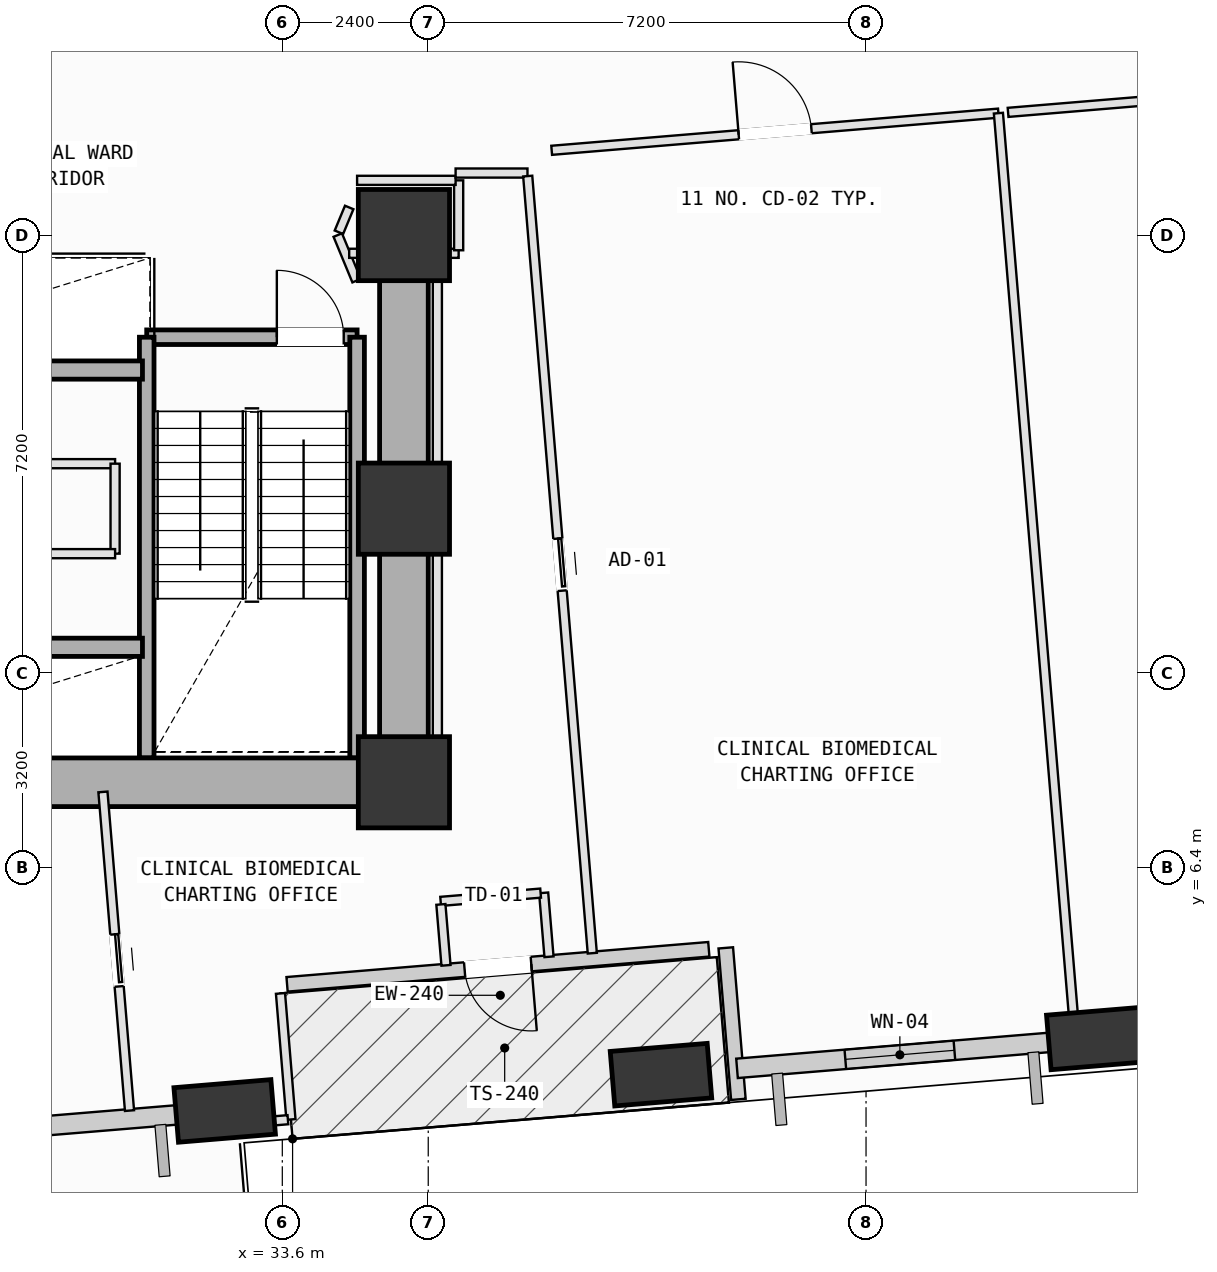
"""IFC4 building model, lengths in metres.
Left out: names, types, materials, properties, quantities, classifications, styles, units other than length and angle.
Written with IfcOpenShell. Run it as: python <this file> out.ifc"""

import sys

from ifc_helpers import new_model, si_unit, direction, frame, frame_2d, origin, origin_2d, place, context, subcontext, project, spatial, rectangle, extrude, element, fill, save


model = new_model("IFC4")
c1 = context("Model", 3, precision=1e-05, world=origin(), true_north=direction((0.0, 1.0)))
c2 = subcontext(c1, "Body", "Model", "MODEL_VIEW")
j1 = project(units=[si_unit("LENGTHUNIT", "METRE"), si_unit("PLANEANGLEUNIT", "RADIAN")], contexts=[c1])
p1 = place(None, origin())
s1 = spatial("IfcSite", under=j1, at=p1, CompositionType="ELEMENT")
p2 = place(p1, origin())
s2 = spatial("IfcBuilding", under=s1, at=p2, CompositionType="ELEMENT")
p3 = place(p2, frame((0.0, 0.0, 43.0)))
s3 = spatial("IfcBuildingStorey", under=s2, at=p3, CompositionType="ELEMENT", Elevation=43.0)
for number, where, z_axis, x_axis in (
    (1, (35.6, 7.8, 0.0), (0.0, 0.0, 1.0), (1.0, 0.0, 0.0)),
    (2, (35.6, 12.3, 0.0), (0.0, 0.0, 1.0), (1.0, 0.0, 0.0)),
    (3, (35.6, 16.8, 0.0), (0.0, 0.0, 1.0), (1.0, 0.0, 0.0)),
):
    element("IfcColumn", number, at=place(p3, frame(where, z_axis=z_axis, x_axis=x_axis)), inside=s3, PredefinedType="COLUMN", context=c2, shape_type="SweptSolid", body=[
        extrude(rectangle(XDim=1.5, YDim=1.5, at=origin_2d()), origin(), (0.0, 0.0, 1.0), 4.0),
    ])
p4 = place(p3, frame((32.652, 2.395, 0.002), z_axis=(0.092454615245, -0.003162921048, 0.995711876022), x_axis=(-0.048331810762, 0.998801958908, 0.007660479794)))
e4 = element("IfcColumn", 4, at=p4, inside=s3, PredefinedType="COLUMN", context=c2, shape_type="SweptSolid", body=[
    extrude(rectangle(XDim=1.6, YDim=0.9, at=origin_2d()), origin(), (0.0, 0.0, 1.0), 4.014),
])
p5 = place(p3, frame((39.828, 2.991, 0.002), z_axis=(0.08976921486, 0.026456374298, 0.995611143129), x_axis=(-0.360804993804, 0.932609081019, 0.007749738583)))
e5 = element("IfcColumn", 5, at=p5, inside=s3, PredefinedType="COLUMN", context=c2, shape_type="SweptSolid", body=[
    extrude(rectangle(XDim=1.6, YDim=0.9, at=origin_2d()), origin(), (0.0, 0.0, 1.0), 4.014),
])
p6 = place(p3, frame((47.003, 3.587, 0.002), z_axis=(0.087007750901, 0.05595959398, 0.99463469431), x_axis=(-0.608351167105, 0.793621744244, 0.008566477999)))
e6 = element("IfcColumn", 6, at=p6, inside=s3, PredefinedType="COLUMN", context=c2, shape_type="SweptSolid", body=[
    extrude(rectangle(XDim=1.6, YDim=0.9, at=origin_2d()), origin(), (0.0, 0.0, 1.0), 4.018),
])
p7 = place(p3, frame((40.614, 5.053, 0.0), z_axis=(0.0, 0.0, 1.0), x_axis=(-0.99656749658, -0.082784205981, 0.0)))
e7 = element("IfcWall", 7, at=p7, inside=s3, PredefinedType="SOLIDWALL", context=c2, shape_type="SweptSolid", body=[
    extrude(rectangle(XDim=6.96, YDim=0.24, at=frame_2d((3.48, 0.0))), origin(), (0.0, 0.0, 1.0), 3.165),
])
p8 = place(p7, frame((2.93, 0.0, 0.0)))
e8 = element("IfcOpeningElement", 8, at=p8, cuts=e7, PredefinedType="OPENING", context=c2, shape_type="SweptSolid", body=[
    extrude(rectangle(XDim=1.1, YDim=2.15, at=frame_2d((0.55, 1.075))), frame((0.0, 0.13, 0.0), z_axis=(0.0, -1.0, 0.0), x_axis=(1.0, 0.0, 0.0)), (0.0, 0.0, 1.0), 0.26),
])
p9 = place(p3, frame((41.1, 2.585, 0.0), z_axis=(0.0, 0.0, 1.0), x_axis=(-0.082811106501, 0.996565261606, 0.0)))
e9 = element("IfcWall", 9, at=p9, inside=s3, PredefinedType="SOLIDWALL", context=c2, shape_type="SweptSolid", body=[
    extrude(rectangle(XDim=2.5, YDim=0.24, at=frame_2d((1.25, 0.0))), origin(), (0.0, 0.0, 1.0), 3.165),
])
p10 = place(p3, frame((32.231, 2.36, 0.0), z_axis=(0.0, 0.0, 1.0), x_axis=(-0.996564006264, -0.082826212145, 0.0)))
e10 = element("IfcWall", 10, at=p10, inside=s3, PredefinedType="SOLIDWALL", context=c2, shape_type="SweptSolid", body=[
    extrude(rectangle(XDim=5.99, YDim=0.32, at=frame_2d((2.995, 0.0))), origin(), (0.0, 0.0, 1.0), 3.165),
])
p11 = place(p10, frame((2.967, 0.0, 0.75)))
e11 = element("IfcOpeningElement", 11, at=p11, cuts=e10, PredefinedType="OPENING", context=c2, shape_type="SweptSolid", body=[
    extrude(rectangle(XDim=1.4, YDim=1.85, at=frame_2d((0.7, 0.925))), frame((0.0, 0.17, 0.0), z_axis=(0.0, -1.0, 0.0), x_axis=(1.0, 0.0, 0.0)), (0.0, 0.0, 1.0), 0.34),
])
p12 = place(p3, frame((46.588, 3.552, 0.0), z_axis=(0.0, 0.0, 1.0), x_axis=(-0.99656613328, -0.082800615939, 0.0)))
e12 = element("IfcWall", 12, at=p12, inside=s3, PredefinedType="SOLIDWALL", context=c2, shape_type="SweptSolid", body=[
    extrude(rectangle(XDim=5.529, YDim=0.32, at=frame_2d((2.764, 0.0))), origin(), (0.0, 0.0, 1.0), 3.145),
])
p13 = place(p12, frame((1.941, 0.0, 0.75)))
e13 = element("IfcOpeningElement", 13, at=p13, cuts=e12, PredefinedType="OPENING", context=c2, shape_type="SweptSolid", body=[
    extrude(rectangle(XDim=1.8, YDim=2.05, at=frame_2d((0.9, 1.025))), frame((0.0, 0.17, 0.0), z_axis=(0.0, -1.0, 0.0), x_axis=(1.0, 0.0, 0.0)), (0.0, 0.0, 1.0), 0.34),
])
p14 = place(p3, frame((31.37, 15.12, 0.0), z_axis=(0.0, 0.0, 1.0), x_axis=(1.0, 0.0, 0.0)))
e14 = element("IfcWall", 14, at=p14, inside=s3, PredefinedType="SOLIDWALL", context=c2, shape_type="SweptSolid", body=[
    extrude(rectangle(XDim=3.46, YDim=0.24, at=frame_2d((1.73, 0.0))), origin(), (0.0, 0.0, 1.0), 3.78),
])
p15 = place(p14, frame((2.14, 0.0, 0.0)))
e15 = element("IfcOpeningElement", 15, at=p15, cuts=e14, PredefinedType="OPENING", context=c2, shape_type="SweptSolid", body=[
    extrude(rectangle(XDim=1.1, YDim=2.15, at=frame_2d((0.55, 1.075))), frame((0.0, 0.13, 0.0), z_axis=(0.0, -1.0, 0.0), x_axis=(1.0, 0.0, 0.0)), (0.0, 0.0, 1.0), 0.26),
])
for number, where, z_axis, x_axis in (
    (16, (34.83, 15.12, 0.0), (0.0, 0.0, 1.0), (0.0, -1.0, 0.0)),
    (17, (31.37, 8.2, 0.0), (0.0, 0.0, 1.0), (0.0, 1.0, 0.0)),
):
    element("IfcWall", number, at=place(p3, frame(where, z_axis=z_axis, x_axis=x_axis)), inside=s3, PredefinedType="SOLIDWALL", context=c2, shape_type="SweptSolid", body=[
        extrude(rectangle(XDim=6.92, YDim=0.24, at=frame_2d((3.46, 0.0))), origin(), (0.0, 0.0, 1.0), 3.78),
    ])
p16 = place(p3, frame((24.8, 7.8, 0.0), z_axis=(0.0, 0.0, 1.0), x_axis=(1.0, 0.0, 0.0)))
e18 = element("IfcWall", 18, at=p16, inside=s3, PredefinedType="SHEAR", context=c2, shape_type="SweptSolid", body=[
    extrude(rectangle(XDim=10.8, YDim=0.8, at=frame_2d((5.4, 0.0))), origin(), (0.0, 0.0, 1.0), 3.78),
])
p17 = place(p3, frame((35.6, 7.8, 0.0), z_axis=(0.0, 0.0, 1.0), x_axis=(0.0, 1.0, 0.0)))
e19 = element("IfcWall", 19, at=p17, inside=s3, PredefinedType="SHEAR", context=c2, shape_type="SweptSolid", body=[
    extrude(rectangle(XDim=9.0, YDim=0.8, at=frame_2d((4.5, 0.0))), origin(), (0.0, 0.0, 1.0), 3.78),
])
p18 = place(p3, frame((25.85, 10.02, 0.0), z_axis=(0.0, 0.0, 1.0), x_axis=(1.0, 0.0, 0.0)))
e20 = element("IfcWall", 20, at=p18, inside=s3, PredefinedType="SOLIDWALL", context=c2, shape_type="SweptSolid", body=[
    extrude(rectangle(XDim=5.45, YDim=0.3, at=frame_2d((2.725, 0.0))), origin(), (0.0, 0.0, 1.0), 3.78),
])
p19 = place(p18, frame((0.34, 0.0, 0.0)))
e21 = element("IfcOpeningElement", 21, at=p19, cuts=e20, PredefinedType="OPENING", context=c2, shape_type="SweptSolid", body=[
    extrude(rectangle(XDim=1.12, YDim=2.15, at=frame_2d((0.56, 1.075))), frame((0.0, 0.16, 0.0), z_axis=(0.0, -1.0, 0.0), x_axis=(1.0, 0.0, 0.0)), (0.0, 0.0, 1.0), 0.32),
])
p20 = place(p18, frame((2.24, 0.0, 0.0)))
e22 = element("IfcOpeningElement", 22, at=p20, cuts=e20, PredefinedType="OPENING", context=c2, shape_type="SweptSolid", body=[
    extrude(rectangle(XDim=1.12, YDim=2.15, at=frame_2d((0.56, 1.075))), frame((0.0, 0.16, 0.0), z_axis=(0.0, -1.0, 0.0), x_axis=(1.0, 0.0, 0.0)), (0.0, 0.0, 1.0), 0.32),
])
p21 = place(p3, frame((25.85, 14.58, 0.0), z_axis=(0.0, 0.0, 1.0), x_axis=(1.0, 0.0, 0.0)))
e23 = element("IfcWall", 23, at=p21, inside=s3, PredefinedType="SOLIDWALL", context=c2, shape_type="SweptSolid", body=[
    extrude(rectangle(XDim=5.45, YDim=0.3, at=frame_2d((2.725, 0.0))), origin(), (0.0, 0.0, 1.0), 3.78),
])
p22 = place(p3, frame((26.45, 13.04, 0.0), z_axis=(0.0, 0.0, 1.0), x_axis=(1.0, 0.0, 0.0)))
e24 = element("IfcWall", 24, at=p22, inside=s3, PredefinedType="PARTITIONING", context=c2, shape_type="SweptSolid", body=[
    extrude(rectangle(XDim=4.4, YDim=0.15, at=frame_2d((2.2, 0.0))), origin(), (0.0, 0.0, 1.0), 3.78),
])
p23 = place(p22, frame((1.74, 0.0, 0.0)))
e25 = element("IfcOpeningElement", 25, at=p23, cuts=e24, PredefinedType="OPENING", context=c2, shape_type="SweptSolid", body=[
    extrude(rectangle(XDim=0.92, YDim=2.1, at=frame_2d((0.46, 1.05))), frame((0.0, 0.085, 0.0), z_axis=(0.0, -1.0, 0.0), x_axis=(1.0, 0.0, 0.0)), (0.0, 0.0, 1.0), 0.17),
])
p24 = place(p3, frame((30.85, 13.04, 0.0), z_axis=(0.0, 0.0, 1.0), x_axis=(0.0, -1.0, 0.0)))
e26 = element("IfcWall", 26, at=p24, inside=s3, PredefinedType="PARTITIONING", context=c2, shape_type="SweptSolid", body=[
    extrude(rectangle(XDim=1.48, YDim=0.15, at=frame_2d((0.74, 0.0))), origin(), (0.0, 0.0, 1.0), 3.78),
])
p25 = place(p3, frame((30.85, 11.56, 0.0), z_axis=(0.0, 0.0, 1.0), x_axis=(-1.0, 0.0, 0.0)))
e27 = element("IfcWall", 27, at=p25, inside=s3, PredefinedType="PARTITIONING", context=c2, shape_type="SweptSolid", body=[
    extrude(rectangle(XDim=4.4, YDim=0.15, at=frame_2d((2.2, 0.0))), origin(), (0.0, 0.0, 1.0), 3.78),
])
p26 = place(p3, frame((30.65, 7.641, 0.0), z_axis=(0.0, 0.0, 1.0), x_axis=(0.083091579505, -0.996541915534, 0.0)))
e28 = element("IfcWall", 28, at=p26, inside=s3, PredefinedType="PARTITIONING", context=c2, shape_type="SweptSolid", body=[
    extrude(rectangle(XDim=5.259, YDim=0.15, at=frame_2d((2.63, 0.0))), origin(), (0.0, 0.0, 1.0), 3.78),
])
p27 = place(p26, frame((2.35, 0.0, 0.0)))
e29 = element("IfcOpeningElement", 29, at=p27, cuts=e28, PredefinedType="OPENING", context=c2, shape_type="SweptSolid", body=[
    extrude(rectangle(XDim=0.86, YDim=2.06, at=frame_2d((0.43, 1.03))), frame((0.0, 0.085, 0.0), z_axis=(0.0, -1.0, 0.0), x_axis=(1.0, 0.0, 0.0)), (0.0, 0.0, 1.0), 0.17),
])
p28 = place(p3, frame((36.15, 7.5, 0.0), z_axis=(0.0, 0.0, 1.0), x_axis=(0.0, 1.0, 0.0)))
e30 = element("IfcWall", 30, at=p28, inside=s3, PredefinedType="PARTITIONING", context=c2, shape_type="SweptSolid", body=[
    extrude(rectangle(XDim=8.84, YDim=0.15, at=frame_2d((4.42, 0.0))), origin(), (0.0, 0.0, 1.0), 3.78),
])
p29 = place(p3, frame((34.822, 16.05, 0.0), z_axis=(0.0, 0.0, 1.0), x_axis=(-0.382050639738, 0.924141389981, 0.0)))
e31 = element("IfcWall", 31, at=p29, inside=s3, PredefinedType="PARTITIONING", context=c2, shape_type="SweptSolid", body=[
    extrude(rectangle(XDim=0.812, YDim=0.15, at=frame_2d((0.406, 0.0))), origin(), (0.0, 0.0, 1.0), 3.78),
])
p30 = place(p3, frame((34.531, 16.846, 0.0), z_axis=(0.0, 0.0, 1.0), x_axis=(0.382612233621, 0.923909020782, 0.0)))
e32 = element("IfcWall", 32, at=p30, inside=s3, PredefinedType="PARTITIONING", context=c2, shape_type="SweptSolid", body=[
    extrude(rectangle(XDim=0.442, YDim=0.15, at=frame_2d((0.221, 0.0))), origin(), (0.0, 0.0, 1.0), 3.78),
])
p31 = place(p3, frame((34.7, 16.5, 0.0), z_axis=(0.0, 0.0, 1.0), x_axis=(1.0, 0.0, 0.0)))
e33 = element("IfcWall", 33, at=p31, inside=s3, PredefinedType="PARTITIONING", context=c2, shape_type="SweptSolid", body=[
    extrude(rectangle(XDim=0.525, YDim=0.15, at=frame_2d((0.263, 0.0))), origin(), (0.0, 0.0, 1.0), 2.865),
])
p32 = place(p3, frame((35.975, 16.5, 0.0), z_axis=(0.0, 0.0, 1.0), x_axis=(1.0, 0.0, 0.0)))
e34 = element("IfcWall", 34, at=p32, inside=s3, PredefinedType="PARTITIONING", context=c2, shape_type="SweptSolid", body=[
    extrude(rectangle(XDim=0.525, YDim=0.15, at=frame_2d((0.262, 0.0))), origin(), (0.0, 0.0, 1.0), 3.78),
])
p33 = place(p3, frame((36.5, 16.55, 0.0), z_axis=(0.0, 0.0, 1.0), x_axis=(0.0, 1.0, 0.0)))
e35 = element("IfcWall", 35, at=p33, inside=s3, PredefinedType="PARTITIONING", context=c2, shape_type="SweptSolid", body=[
    extrude(rectangle(XDim=1.15, YDim=0.15, at=frame_2d((0.575, 0.0))), origin(), (0.0, 0.0, 1.0), 3.78),
])
p34 = place(p3, frame((36.45, 17.7, 0.0), z_axis=(0.0, 0.0, 1.0), x_axis=(-1.0, 0.0, 0.0)))
e36 = element("IfcWall", 36, at=p34, inside=s3, PredefinedType="PARTITIONING", context=c2, shape_type="SweptSolid", body=[
    extrude(rectangle(XDim=1.62, YDim=0.15, at=frame_2d((0.81, 0.0))), origin(), (0.0, 0.0, 1.0), 3.78),
])
p35 = place(p3, frame((36.45, 17.82, 0.0), z_axis=(0.0, 0.0, 1.0), x_axis=(1.0, 0.0, 0.0)))
e37 = element("IfcWall", 37, at=p35, inside=s3, PredefinedType="PARTITIONING", context=c2, shape_type="SweptSolid", body=[
    extrude(rectangle(XDim=1.182, YDim=0.15, at=frame_2d((0.591, 0.0))), origin(), (0.0, 0.0, 1.0), 3.78),
])
p36 = place(p3, frame((37.636, 17.77, 0.0), z_axis=(0.0, 0.0, 1.0), x_axis=(0.082807590284, -0.996565553785, 0.0)))
e38 = element("IfcWall", 38, at=p36, inside=s3, PredefinedType="PARTITIONING", context=c2, shape_type="SweptSolid", body=[
    extrude(rectangle(XDim=12.825, YDim=0.15, at=frame_2d((6.413, 0.0))), origin(), (0.0, 0.0, 1.0), 3.78),
])
p37 = place(p36, frame((5.982, 0.0, 0.0)))
e39 = element("IfcOpeningElement", 39, at=p37, cuts=e38, PredefinedType="OPENING", context=c2, shape_type="SweptSolid", body=[
    extrude(rectangle(XDim=0.86, YDim=2.06, at=frame_2d((0.43, 1.03))), frame((0.0, 0.085, 0.0), z_axis=(0.0, -1.0, 0.0), x_axis=(1.0, 0.0, 0.0)), (0.0, 0.0, 1.0), 0.17),
])
p38 = place(p3, frame((37.986, 4.93, 0.0), z_axis=(0.0, 0.0, 1.0), x_axis=(-0.083562696939, 0.996502521663, 0.0)))
e40 = element("IfcWall", 40, at=p38, inside=s3, PredefinedType="PARTITIONING", context=c2, shape_type="SweptSolid", body=[
    extrude(rectangle(XDim=1.055, YDim=0.15, at=frame_2d((0.527, 0.0))), origin(), (0.0, 0.0, 1.0), 3.78),
])
p39 = place(p3, frame((37.848, 5.977, 0.0), z_axis=(0.0, 0.0, 1.0), x_axis=(-0.996595596875, -0.08244523206, 0.0)))
e41 = element("IfcWall", 41, at=p39, inside=s3, PredefinedType="PARTITIONING", context=c2, shape_type="SweptSolid", body=[
    extrude(rectangle(XDim=1.649, YDim=0.15, at=frame_2d((0.825, 0.0))), origin(), (0.0, 0.0, 1.0), 3.78),
])
p40 = place(p3, frame((36.208, 5.791, 0.0), z_axis=(0.0, 0.0, 1.0), x_axis=(0.083527747419, -0.996505451772, 0.0)))
e42 = element("IfcWall", 42, at=p40, inside=s3, PredefinedType="PARTITIONING", context=c2, shape_type="SweptSolid", body=[
    extrude(rectangle(XDim=1.005, YDim=0.15, at=frame_2d((0.503, 0.0))), origin(), (0.0, 0.0, 1.0), 3.78),
])
p41 = place(p3, frame((33.57, 4.327, 0.0), z_axis=(0.0, 0.0, 1.0), x_axis=(0.082627800683, -0.996580476707, 0.0)))
e43 = element("IfcWall", 43, at=p41, inside=s3, PredefinedType="PARTITIONING", context=c2, shape_type="SweptSolid", body=[
    extrude(rectangle(XDim=2.08, YDim=0.15, at=frame_2d((1.04, 0.0))), origin(), (0.0, 0.0, 1.0), 3.78),
])
p42 = place(p3, frame((33.692, 2.25, 0.0), z_axis=(0.0, 0.0, 1.0), x_axis=(-0.996548085231, -0.083017551293, 0.0)))
e44 = element("IfcWall", 44, at=p42, inside=s3, PredefinedType="PARTITIONING", context=c2, shape_type="SweptSolid", body=[
    extrude(rectangle(XDim=1.447, YDim=0.15, at=frame_2d((0.723, 0.0))), origin(), (0.0, 0.0, 1.0), 3.145),
])
p43 = place(p3, frame((38.03, 18.194, 0.0), z_axis=(0.0, 0.0, 1.0), x_axis=(0.996561498978, 0.082856374255, 0.0)))
e45 = element("IfcWall", 45, at=p43, inside=s3, PredefinedType="PARTITIONING", context=c2, shape_type="SweptSolid", body=[
    extrude(rectangle(XDim=7.372, YDim=0.15, at=frame_2d((3.686, 0.0))), origin(), (0.0, 0.0, 1.0), 3.78),
])
p44 = place(p43, frame((3.086, 0.0, 0.0)))
e46 = element("IfcOpeningElement", 46, at=p44, cuts=e45, PredefinedType="OPENING", context=c2, shape_type="SweptSolid", body=[
    extrude(rectangle(XDim=1.2, YDim=2.15, at=frame_2d((0.6, 1.075))), frame((0.0, 0.085, 0.0), z_axis=(0.0, -1.0, 0.0), x_axis=(1.0, 0.0, 0.0)), (0.0, 0.0, 1.0), 0.17),
])
p45 = place(p3, frame((45.377, 18.805, 0.0), z_axis=(0.0, 0.0, 1.0), x_axis=(0.082821840324, -0.996564369605, 0.0)))
e47 = element("IfcWall", 47, at=p45, inside=s3, PredefinedType="PARTITIONING", context=c2, shape_type="SweptSolid", body=[
    extrude(rectangle(XDim=15.178, YDim=0.15, at=frame_2d((7.589, 0.0))), origin(), (0.0, 0.0, 1.0), 3.78),
])
p46 = place(p3, frame((45.536, 18.818, 0.0), z_axis=(0.0, 0.0, 1.0), x_axis=(0.996564025251, 0.082825983694, 0.0)))
e48 = element("IfcWall", 48, at=p46, inside=s3, PredefinedType="PARTITIONING", context=c2, shape_type="SweptSolid", body=[
    extrude(rectangle(XDim=7.64, YDim=0.15, at=frame_2d((3.82, 0.0))), origin(), (0.0, 0.0, 1.0), 3.78),
])
p47 = place(p46, frame((3.22, 0.0, 0.0)))
e49 = element("IfcOpeningElement", 49, at=p47, cuts=e48, PredefinedType="OPENING", context=c2, shape_type="SweptSolid", body=[
    extrude(rectangle(XDim=1.2, YDim=2.15, at=frame_2d((0.6, 1.075))), frame((0.0, 0.085, 0.0), z_axis=(0.0, -1.0, 0.0), x_axis=(1.0, 0.0, 0.0)), (0.0, 0.0, 1.0), 0.17),
])
p48 = place(p3, frame((47.803, 3.423, 0.0), z_axis=(0.0, 0.0, 1.0), x_axis=(-0.9965217706, -0.083332830991, 0.0)))
e50 = element("IfcWall", 50, at=p48, inside=s3, PredefinedType="PARTITIONING", context=c2, shape_type="SweptSolid", body=[
    extrude(rectangle(XDim=0.984, YDim=0.15, at=frame_2d((0.492, 0.0))), origin(), (0.0, 0.0, 1.0), 3.145),
])
p49 = place(p8, origin())
e51 = element("IfcDoor", 51, at=p49, inside=s3, OperationType="SINGLE_SWING_LEFT", PredefinedType="DOOR", context=c2, shape_type="SweptSolid", body=[
    extrude(rectangle(XDim=1.1, YDim=2.15, at=frame_2d((0.55, 1.075))), frame((0.0, 0.025, 0.0), z_axis=(0.0, -1.0, 0.0), x_axis=(1.0, 0.0, 0.0)), (0.0, 0.0, 1.0), 0.05),
])
fill(e8, e51)
p50 = place(p13, origin())
e52 = element("IfcWindow", 52, at=p50, inside=s3, PartitioningType="SINGLE_PANEL", PredefinedType="WINDOW", context=c2, shape_type="SweptSolid", body=[
    extrude(rectangle(XDim=1.8, YDim=2.05, at=frame_2d((0.9, 1.025))), frame((0.0, 0.03, 0.0), z_axis=(0.0, -1.0, 0.0), x_axis=(1.0, 0.0, 0.0)), (0.0, 0.0, 1.0), 0.06),
])
fill(e13, e52)
p51 = place(p15, origin())
e53 = element("IfcDoor", 53, at=p51, inside=s3, OperationType="SINGLE_SWING_LEFT", PredefinedType="DOOR", context=c2, shape_type="SweptSolid", body=[
    extrude(rectangle(XDim=1.1, YDim=2.15, at=frame_2d((0.55, 1.075))), frame((0.0, 0.025, 0.0), z_axis=(0.0, -1.0, 0.0), x_axis=(1.0, 0.0, 0.0)), (0.0, 0.0, 1.0), 0.05),
])
fill(e15, e53)
p52 = place(p44, origin())
e54 = element("IfcDoor", 54, at=p52, inside=s3, OperationType="SINGLE_SWING_LEFT", PredefinedType="DOOR", context=c2, shape_type="SweptSolid", body=[
    extrude(rectangle(XDim=1.2, YDim=2.15, at=frame_2d((0.6, 1.075))), frame((0.0, 0.025, 0.0), z_axis=(0.0, -1.0, 0.0), x_axis=(1.0, 0.0, 0.0)), (0.0, 0.0, 1.0), 0.05),
])
fill(e46, e54)
p53 = place(p37, origin())
e55 = element("IfcDoor", 55, at=p53, inside=s3, OperationType="SLIDING_TO_LEFT", PredefinedType="DOOR", context=c2, shape_type="SweptSolid", body=[
    extrude(rectangle(XDim=0.86, YDim=2.06, at=frame_2d((0.43, 1.03))), frame((0.0, 0.025, 0.0), z_axis=(0.0, -1.0, 0.0), x_axis=(1.0, 0.0, 0.0)), (0.0, 0.0, 1.0), 0.05),
])
fill(e39, e55)
p54 = place(p27, origin())
e56 = element("IfcDoor", 56, at=p54, inside=s3, OperationType="SLIDING_TO_LEFT", PredefinedType="DOOR", context=c2, shape_type="SweptSolid", body=[
    extrude(rectangle(XDim=0.86, YDim=2.06, at=frame_2d((0.43, 1.03))), frame((0.0, 0.025, 0.0), z_axis=(0.0, -1.0, 0.0), x_axis=(1.0, 0.0, 0.0)), (0.0, 0.0, 1.0), 0.05),
])
fill(e29, e56)
save(model, sys.argv[1])
